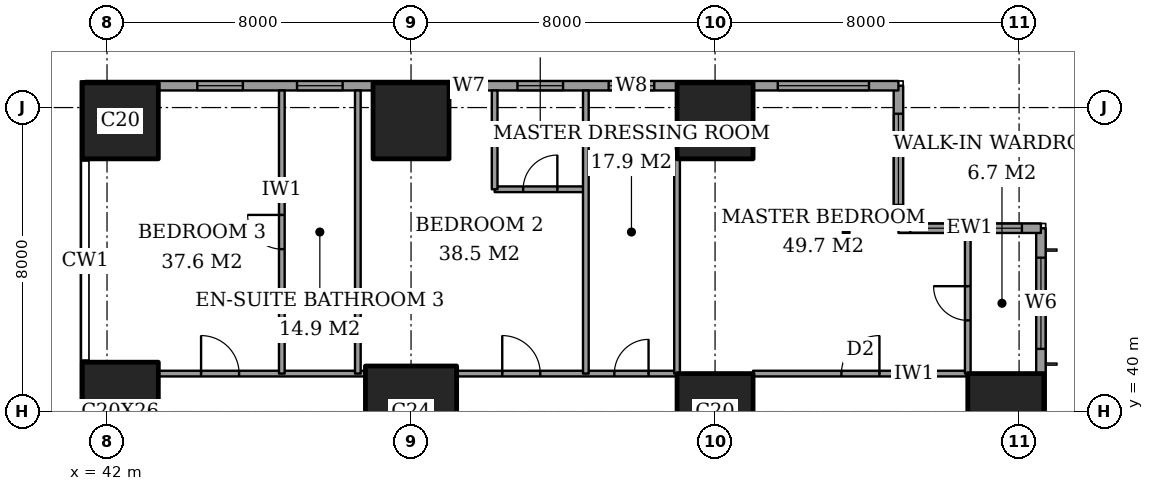
"""IFC4 building model, lengths in metres.
Left out: names, types, materials, properties, quantities, classifications, styles, units other than length and angle.
Written with IfcOpenShell. Run it as: python <this file> out.ifc"""

import sys

from ifc_helpers import new_model, si_unit, direction, frame, frame_2d, origin, origin_2d, place, context, subcontext, project, spatial, rectangle, extrude, element, fill, save


model = new_model("IFC4")
c1 = context("Model", 3, precision=1e-05, world=origin(), true_north=direction((0.0, 1.0)))
c2 = subcontext(c1, "Body", "Model", "MODEL_VIEW")
j1 = project(units=[si_unit("LENGTHUNIT", "METRE"), si_unit("PLANEANGLEUNIT", "RADIAN")], contexts=[c1])
p1 = place(None, origin())
s1 = spatial("IfcSite", under=j1, at=p1, CompositionType="ELEMENT")
p2 = place(p1, origin())
s2 = spatial("IfcBuilding", under=s1, at=p2, CompositionType="ELEMENT")
p3 = place(p2, frame((0.0, 0.0, 87.2)))
s3 = spatial("IfcBuildingStorey", under=s2, at=p3, CompositionType="ELEMENT", Elevation=87.2)
p4 = place(p3, frame((42.35, 40.0, 0.0), z_axis=(0.0, 0.0, 1.0), x_axis=(1.0, 0.0, 0.0)))
e1 = element("IfcColumn", 1, at=p4, inside=s3, PredefinedType="COLUMN", context=c2, shape_type="SweptSolid", body=[
    extrude(rectangle(XDim=2.0, YDim=2.6, at=origin_2d()), origin(), (0.0, 0.0, 1.0), 3.6),
])
p5 = place(p3, frame((42.35, 47.65, 0.0), z_axis=(0.0, 0.0, 1.0), x_axis=(1.0, 0.0, 0.0)))
e2 = element("IfcColumn", 2, at=p5, inside=s3, PredefinedType="COLUMN", context=c2, shape_type="SweptSolid", body=[
    extrude(rectangle(XDim=2.0, YDim=2.0, at=origin_2d()), origin(), (0.0, 0.0, 1.0), 3.6),
])
p6 = place(p3, frame((50.0, 40.0, 0.0), z_axis=(0.0, 0.0, 1.0), x_axis=(1.0, 0.0, 0.0)))
e3 = element("IfcColumn", 3, at=p6, inside=s3, PredefinedType="COLUMN", context=c2, shape_type="SweptSolid", body=[
    extrude(rectangle(XDim=2.4, YDim=2.4, at=origin_2d()), origin(), (0.0, 0.0, 1.0), 3.6),
])
for number, where, z_axis, x_axis in (
    (4, (50.0, 47.65, 0.0), (0.0, 0.0, 1.0), (1.0, 0.0, 0.0)),
    (5, (58.0, 40.0, 0.0), (0.0, 0.0, 1.0), (1.0, 0.0, 0.0)),
    (6, (58.0, 47.65, 0.0), (0.0, 0.0, 1.0), (1.0, 0.0, 0.0)),
    (7, (65.65, 40.0, 0.0), (0.0, 0.0, 1.0), (1.0, 0.0, 0.0)),
):
    element("IfcColumn", number, at=place(p3, frame(where, z_axis=z_axis, x_axis=x_axis)), inside=s3, PredefinedType="COLUMN", context=c2, shape_type="SweptSolid", body=[
        extrude(rectangle(XDim=2.0, YDim=2.0, at=origin_2d()), origin(), (0.0, 0.0, 1.0), 3.6),
    ])
p7 = place(p3, frame((66.575, 3.175, 0.0), z_axis=(0.0, 0.0, 1.0), x_axis=(0.0, 1.0, 0.0)))
e8 = element("IfcWall", 8, at=p7, inside=s3, PredefinedType="SOLIDWALL", context=c2, shape_type="SweptSolid", body=[
    extrude(rectangle(XDim=41.65, YDim=0.25, at=frame_2d((20.825, 0.0))), origin(), (0.0, 0.0, 1.0), 3.6),
])
p8 = place(p7, frame((0.775, 0.0, 0.6)))
e9 = element("IfcOpeningElement", 9, at=p8, cuts=e8, PredefinedType="OPENING", context=c2, shape_type="SweptSolid", body=[
    extrude(rectangle(XDim=2.4, YDim=2.0, at=frame_2d((1.2, 1.0))), frame((0.0, 0.135, 0.0), z_axis=(0.0, -1.0, 0.0), x_axis=(1.0, 0.0, 0.0)), (0.0, 0.0, 1.0), 0.27),
])
p9 = place(p7, frame((6.1, 0.0, 0.6)))
e10 = element("IfcOpeningElement", 10, at=p9, cuts=e8, PredefinedType="OPENING", context=c2, shape_type="SweptSolid", body=[
    extrude(rectangle(XDim=1.2, YDim=2.0, at=frame_2d((0.6, 1.0))), frame((0.0, 0.135, 0.0), z_axis=(0.0, -1.0, 0.0), x_axis=(1.0, 0.0, 0.0)), (0.0, 0.0, 1.0), 0.27),
])
p10 = place(p7, frame((8.275, 0.0, 0.6)))
e11 = element("IfcOpeningElement", 11, at=p10, cuts=e8, PredefinedType="OPENING", context=c2, shape_type="SweptSolid", body=[
    extrude(rectangle(XDim=2.4, YDim=2.0, at=frame_2d((1.2, 1.0))), frame((0.0, 0.135, 0.0), z_axis=(0.0, -1.0, 0.0), x_axis=(1.0, 0.0, 0.0)), (0.0, 0.0, 1.0), 0.27),
])
p11 = place(p7, frame((15.775, 0.0, 0.6)))
e12 = element("IfcOpeningElement", 12, at=p11, cuts=e8, PredefinedType="OPENING", context=c2, shape_type="SweptSolid", body=[
    extrude(rectangle(XDim=2.4, YDim=2.0, at=frame_2d((1.2, 1.0))), frame((0.0, 0.135, 0.0), z_axis=(0.0, -1.0, 0.0), x_axis=(1.0, 0.0, 0.0)), (0.0, 0.0, 1.0), 0.27),
])
p12 = place(p7, frame((23.475, 0.0, 0.6)))
e13 = element("IfcOpeningElement", 13, at=p12, cuts=e8, PredefinedType="OPENING", context=c2, shape_type="SweptSolid", body=[
    extrude(rectangle(XDim=2.4, YDim=2.0, at=frame_2d((1.2, 1.0))), frame((0.0, 0.135, 0.0), z_axis=(0.0, -1.0, 0.0), x_axis=(1.0, 0.0, 0.0)), (0.0, 0.0, 1.0), 0.27),
])
p13 = place(p7, frame((30.975, 0.0, 0.6)))
e14 = element("IfcOpeningElement", 14, at=p13, cuts=e8, PredefinedType="OPENING", context=c2, shape_type="SweptSolid", body=[
    extrude(rectangle(XDim=2.4, YDim=2.0, at=frame_2d((1.2, 1.0))), frame((0.0, 0.135, 0.0), z_axis=(0.0, -1.0, 0.0), x_axis=(1.0, 0.0, 0.0)), (0.0, 0.0, 1.0), 0.27),
])
p14 = place(p7, frame((34.5, 0.0, 0.6)))
e15 = element("IfcOpeningElement", 15, at=p14, cuts=e8, PredefinedType="OPENING", context=c2, shape_type="SweptSolid", body=[
    extrude(rectangle(XDim=1.2, YDim=2.0, at=frame_2d((0.6, 1.0))), frame((0.0, 0.135, 0.0), z_axis=(0.0, -1.0, 0.0), x_axis=(1.0, 0.0, 0.0)), (0.0, 0.0, 1.0), 0.27),
])
p15 = place(p7, frame((38.475, 0.0, 0.6)))
e16 = element("IfcOpeningElement", 16, at=p15, cuts=e8, PredefinedType="OPENING", context=c2, shape_type="SweptSolid", body=[
    extrude(rectangle(XDim=2.4, YDim=2.0, at=frame_2d((1.2, 1.0))), frame((0.0, 0.135, 0.0), z_axis=(0.0, -1.0, 0.0), x_axis=(1.0, 0.0, 0.0)), (0.0, 0.0, 1.0), 0.27),
])
p16 = place(p3, frame((66.575, 44.825, 0.0), z_axis=(0.0, 0.0, 1.0), x_axis=(-1.0, 0.0, 0.0)))
e17 = element("IfcWall", 17, at=p16, inside=s3, PredefinedType="SOLIDWALL", context=c2, shape_type="SweptSolid", body=[
    extrude(rectangle(XDim=3.75, YDim=0.25, at=frame_2d((1.875, 0.0))), origin(), (0.0, 0.0, 1.0), 3.6),
])
p17 = place(p16, frame((0.5, 0.0, 0.6)))
e18 = element("IfcOpeningElement", 18, at=p17, cuts=e17, PredefinedType="OPENING", context=c2, shape_type="SweptSolid", body=[
    extrude(rectangle(XDim=1.2, YDim=2.0, at=frame_2d((0.6, 1.0))), frame((0.0, 0.135, 0.0), z_axis=(0.0, -1.0, 0.0), x_axis=(1.0, 0.0, 0.0)), (0.0, 0.0, 1.0), 0.27),
])
p18 = place(p16, frame((2.238, 0.0, 0.6)))
e19 = element("IfcOpeningElement", 19, at=p18, cuts=e17, PredefinedType="OPENING", context=c2, shape_type="SweptSolid", body=[
    extrude(rectangle(XDim=1.2, YDim=2.0, at=frame_2d((0.6, 1.0))), frame((0.0, 0.135, 0.0), z_axis=(0.0, -1.0, 0.0), x_axis=(1.0, 0.0, 0.0)), (0.0, 0.0, 1.0), 0.27),
])
p19 = place(p3, frame((62.825, 44.825, 0.0), z_axis=(0.0, 0.0, 1.0), x_axis=(0.0, 1.0, 0.0)))
e20 = element("IfcWall", 20, at=p19, inside=s3, PredefinedType="SOLIDWALL", context=c2, shape_type="SweptSolid", body=[
    extrude(rectangle(XDim=3.75, YDim=0.25, at=frame_2d((1.875, 0.0))), origin(), (0.0, 0.0, 1.0), 3.6),
])
p20 = place(p19, frame((0.613, 0.0, 0.6)))
e21 = element("IfcOpeningElement", 21, at=p20, cuts=e20, PredefinedType="OPENING", context=c2, shape_type="SweptSolid", body=[
    extrude(rectangle(XDim=2.4, YDim=2.0, at=frame_2d((1.2, 1.0))), frame((0.0, 0.135, 0.0), z_axis=(0.0, -1.0, 0.0), x_axis=(1.0, 0.0, 0.0)), (0.0, 0.0, 1.0), 0.27),
])
p21 = place(p3, frame((62.825, 48.575, 0.0), z_axis=(0.0, 0.0, 1.0), x_axis=(-1.0, 0.0, 0.0)))
e22 = element("IfcWall", 22, at=p21, inside=s3, PredefinedType="SOLIDWALL", context=c2, shape_type="SweptSolid", body=[
    extrude(rectangle(XDim=21.4, YDim=0.25, at=frame_2d((10.7, 0.0))), origin(), (0.0, 0.0, 1.0), 3.6),
])
p22 = place(p21, frame((0.775, 0.0, 0.6)))
e23 = element("IfcOpeningElement", 23, at=p22, cuts=e22, PredefinedType="OPENING", context=c2, shape_type="SweptSolid", body=[
    extrude(rectangle(XDim=2.4, YDim=2.0, at=frame_2d((1.2, 1.0))), frame((0.0, 0.135, 0.0), z_axis=(0.0, -1.0, 0.0), x_axis=(1.0, 0.0, 0.0)), (0.0, 0.0, 1.0), 0.27),
])
p23 = place(p21, frame((6.425, 0.0, 0.6)))
e24 = element("IfcOpeningElement", 24, at=p23, cuts=e22, PredefinedType="OPENING", context=c2, shape_type="SweptSolid", body=[
    extrude(rectangle(XDim=1.2, YDim=2.0, at=frame_2d((0.6, 1.0))), frame((0.0, 0.135, 0.0), z_axis=(0.0, -1.0, 0.0), x_axis=(1.0, 0.0, 0.0)), (0.0, 0.0, 1.0), 0.27),
])
p24 = place(p21, frame((8.825, 0.0, 0.6)))
e25 = element("IfcOpeningElement", 25, at=p24, cuts=e22, PredefinedType="OPENING", context=c2, shape_type="SweptSolid", body=[
    extrude(rectangle(XDim=1.2, YDim=2.0, at=frame_2d((0.6, 1.0))), frame((0.0, 0.135, 0.0), z_axis=(0.0, -1.0, 0.0), x_axis=(1.0, 0.0, 0.0)), (0.0, 0.0, 1.0), 0.27),
])
p25 = place(p21, frame((11.0, 0.0, 0.6)))
e26 = element("IfcOpeningElement", 26, at=p25, cuts=e22, PredefinedType="OPENING", context=c2, shape_type="SweptSolid", body=[
    extrude(rectangle(XDim=0.6, YDim=2.0, at=frame_2d((0.3, 1.0))), frame((0.0, 0.135, 0.0), z_axis=(0.0, -1.0, 0.0), x_axis=(1.0, 0.0, 0.0)), (0.0, 0.0, 1.0), 0.27),
])
p26 = place(p21, frame((14.625, 0.0, 0.6)))
e27 = element("IfcOpeningElement", 27, at=p26, cuts=e22, PredefinedType="OPENING", context=c2, shape_type="SweptSolid", body=[
    extrude(rectangle(XDim=1.2, YDim=2.0, at=frame_2d((0.6, 1.0))), frame((0.0, 0.135, 0.0), z_axis=(0.0, -1.0, 0.0), x_axis=(1.0, 0.0, 0.0)), (0.0, 0.0, 1.0), 0.27),
])
p27 = place(p21, frame((17.25, 0.0, 0.6)))
e28 = element("IfcOpeningElement", 28, at=p27, cuts=e22, PredefinedType="OPENING", context=c2, shape_type="SweptSolid", body=[
    extrude(rectangle(XDim=1.2, YDim=2.0, at=frame_2d((0.6, 1.0))), frame((0.0, 0.135, 0.0), z_axis=(0.0, -1.0, 0.0), x_axis=(1.0, 0.0, 0.0)), (0.0, 0.0, 1.0), 0.27),
])
p28 = place(p3, frame((43.35, 41.0, 0.0), z_axis=(0.0, 0.0, 1.0), x_axis=(1.0, 0.0, 0.0)))
e29 = element("IfcWall", 29, at=p28, inside=s3, PredefinedType="PARTITIONING", context=c2, shape_type="SweptSolid", body=[
    extrude(rectangle(XDim=5.45, YDim=0.15, at=frame_2d((2.725, 0.0))), origin(), (0.0, 0.0, 1.0), 3.25),
])
p29 = place(p28, frame((1.125, 0.0, 0.0)))
e30 = element("IfcOpeningElement", 30, at=p29, cuts=e29, PredefinedType="OPENING", context=c2, shape_type="SweptSolid", body=[
    extrude(rectangle(XDim=1.0, YDim=2.1, at=frame_2d((0.5, 1.05))), frame((0.0, 0.085, 0.0), z_axis=(0.0, -1.0, 0.0), x_axis=(1.0, 0.0, 0.0)), (0.0, 0.0, 1.0), 0.17),
])
p30 = place(p3, frame((51.2, 41.0, 0.0), z_axis=(0.0, 0.0, 1.0), x_axis=(1.0, 0.0, 0.0)))
e31 = element("IfcWall", 31, at=p30, inside=s3, PredefinedType="PARTITIONING", context=c2, shape_type="SweptSolid", body=[
    extrude(rectangle(XDim=5.8, YDim=0.15, at=frame_2d((2.9, 0.0))), origin(), (0.0, 0.0, 1.0), 3.25),
])
p31 = place(p30, frame((4.15, 0.0, 0.0)))
e32 = element("IfcOpeningElement", 32, at=p31, cuts=e31, PredefinedType="OPENING", context=c2, shape_type="SweptSolid", body=[
    extrude(rectangle(XDim=0.9, YDim=2.1, at=frame_2d((0.45, 1.05))), frame((0.0, 0.085, 0.0), z_axis=(0.0, -1.0, 0.0), x_axis=(1.0, 0.0, 0.0)), (0.0, 0.0, 1.0), 0.17),
])
p32 = place(p30, frame((1.2, 0.0, 0.0)))
e33 = element("IfcOpeningElement", 33, at=p32, cuts=e31, PredefinedType="OPENING", context=c2, shape_type="SweptSolid", body=[
    extrude(rectangle(XDim=1.0, YDim=2.1, at=frame_2d((0.5, 1.05))), frame((0.0, 0.085, 0.0), z_axis=(0.0, -1.0, 0.0), x_axis=(1.0, 0.0, 0.0)), (0.0, 0.0, 1.0), 0.17),
])
p33 = place(p3, frame((59.0, 41.0, 0.0), z_axis=(0.0, 0.0, 1.0), x_axis=(1.0, 0.0, 0.0)))
e34 = element("IfcWall", 34, at=p33, inside=s3, PredefinedType="PARTITIONING", context=c2, shape_type="SweptSolid", body=[
    extrude(rectangle(XDim=5.65, YDim=0.15, at=frame_2d((2.825, 0.0))), origin(), (0.0, 0.0, 1.0), 3.25),
])
p34 = place(p33, frame((2.325, 0.0, 0.0)))
e35 = element("IfcOpeningElement", 35, at=p34, cuts=e34, PredefinedType="OPENING", context=c2, shape_type="SweptSolid", body=[
    extrude(rectangle(XDim=1.0, YDim=2.1, at=frame_2d((0.5, 1.05))), frame((0.0, 0.085, 0.0), z_axis=(0.0, -1.0, 0.0), x_axis=(1.0, 0.0, 0.0)), (0.0, 0.0, 1.0), 0.17),
])
p35 = place(p3, frame((52.2, 45.85, 0.0), z_axis=(0.0, 0.0, 1.0), x_axis=(1.0, 0.0, 0.0)))
e36 = element("IfcWall", 36, at=p35, inside=s3, PredefinedType="PARTITIONING", context=c2, shape_type="SweptSolid", body=[
    extrude(rectangle(XDim=2.4, YDim=0.15, at=frame_2d((1.2, 0.0))), origin(), (0.0, 0.0, 1.0), 3.25),
])
p36 = place(p35, frame((0.75, 0.0, 0.0)))
e37 = element("IfcOpeningElement", 37, at=p36, cuts=e36, PredefinedType="OPENING", context=c2, shape_type="SweptSolid", body=[
    extrude(rectangle(XDim=0.9, YDim=2.1, at=frame_2d((0.45, 1.05))), frame((0.0, 0.085, 0.0), z_axis=(0.0, -1.0, 0.0), x_axis=(1.0, 0.0, 0.0)), (0.0, 0.0, 1.0), 0.17),
])
p37 = place(p3, frame((46.6, 41.0, 0.0), z_axis=(0.0, 0.0, 1.0), x_axis=(0.0, 1.0, 0.0)))
e38 = element("IfcWall", 38, at=p37, inside=s3, PredefinedType="PARTITIONING", context=c2, shape_type="SweptSolid", body=[
    extrude(rectangle(XDim=7.45, YDim=0.15, at=frame_2d((3.725, 0.0))), origin(), (0.0, 0.0, 1.0), 3.25),
])
p38 = place(p37, frame((3.275, 0.0, 0.0)))
e39 = element("IfcOpeningElement", 39, at=p38, cuts=e38, PredefinedType="OPENING", context=c2, shape_type="SweptSolid", body=[
    extrude(rectangle(XDim=0.9, YDim=2.1, at=frame_2d((0.45, 1.05))), frame((0.0, 0.085, 0.0), z_axis=(0.0, -1.0, 0.0), x_axis=(1.0, 0.0, 0.0)), (0.0, 0.0, 1.0), 0.17),
])
p39 = place(p3, frame((48.6, 41.0, 0.0), z_axis=(0.0, 0.0, 1.0), x_axis=(0.0, 1.0, 0.0)))
e40 = element("IfcWall", 40, at=p39, inside=s3, PredefinedType="PARTITIONING", context=c2, shape_type="SweptSolid", body=[
    extrude(rectangle(XDim=7.45, YDim=0.15, at=frame_2d((3.725, 0.0))), origin(), (0.0, 0.0, 1.0), 3.25),
])
p40 = place(p3, frame((52.2, 45.85, 0.0), z_axis=(0.0, 0.0, 1.0), x_axis=(0.0, 1.0, 0.0)))
e41 = element("IfcWall", 41, at=p40, inside=s3, PredefinedType="PARTITIONING", context=c2, shape_type="SweptSolid", body=[
    extrude(rectangle(XDim=2.6, YDim=0.15, at=frame_2d((1.3, 0.0))), origin(), (0.0, 0.0, 1.0), 3.25),
])
p41 = place(p3, frame((54.6, 41.0, 0.0), z_axis=(0.0, 0.0, 1.0), x_axis=(0.0, 1.0, 0.0)))
e42 = element("IfcWall", 42, at=p41, inside=s3, PredefinedType="PARTITIONING", context=c2, shape_type="SweptSolid", body=[
    extrude(rectangle(XDim=7.45, YDim=0.15, at=frame_2d((3.725, 0.0))), origin(), (0.0, 0.0, 1.0), 3.25),
])
p42 = place(p3, frame((57.0, 41.0, 0.0), z_axis=(0.0, 0.0, 1.0), x_axis=(0.0, 1.0, 0.0)))
e43 = element("IfcWall", 43, at=p42, inside=s3, PredefinedType="PARTITIONING", context=c2, shape_type="SweptSolid", body=[
    extrude(rectangle(XDim=5.65, YDim=0.15, at=frame_2d((2.825, 0.0))), origin(), (0.0, 0.0, 1.0), 3.25),
])
p43 = place(p3, frame((64.65, 41.0, 0.0), z_axis=(0.0, 0.0, 1.0), x_axis=(0.0, 1.0, 0.0)))
e44 = element("IfcWall", 44, at=p43, inside=s3, PredefinedType="PARTITIONING", context=c2, shape_type="SweptSolid", body=[
    extrude(rectangle(XDim=3.7, YDim=0.15, at=frame_2d((1.85, 0.0))), origin(), (0.0, 0.0, 1.0), 3.25),
])
p44 = place(p43, frame((1.4, 0.0, 0.0)))
e45 = element("IfcOpeningElement", 45, at=p44, cuts=e44, PredefinedType="OPENING", context=c2, shape_type="SweptSolid", body=[
    extrude(rectangle(XDim=0.9, YDim=2.1, at=frame_2d((0.45, 1.05))), frame((0.0, 0.085, 0.0), z_axis=(0.0, -1.0, 0.0), x_axis=(1.0, 0.0, 0.0)), (0.0, 0.0, 1.0), 0.17),
])
p45 = place(p15, origin())
e46 = element("IfcWindow", 46, at=p45, inside=s3, PartitioningType="SINGLE_PANEL", PredefinedType="WINDOW", context=c2, shape_type="SweptSolid", body=[
    extrude(rectangle(XDim=2.4, YDim=2.0, at=frame_2d((1.2, 1.0))), frame((0.0, 0.03, 0.0), z_axis=(0.0, -1.0, 0.0), x_axis=(1.0, 0.0, 0.0)), (0.0, 0.0, 1.0), 0.06),
])
fill(e16, e46)
p46 = place(p17, origin())
e47 = element("IfcWindow", 47, at=p46, inside=s3, PartitioningType="SINGLE_PANEL", PredefinedType="WINDOW", context=c2, shape_type="SweptSolid", body=[
    extrude(rectangle(XDim=1.2, YDim=2.0, at=frame_2d((0.6, 1.0))), frame((0.0, 0.03, 0.0), z_axis=(0.0, -1.0, 0.0), x_axis=(1.0, 0.0, 0.0)), (0.0, 0.0, 1.0), 0.06),
])
fill(e18, e47)
p47 = place(p18, origin())
e48 = element("IfcWindow", 48, at=p47, inside=s3, PartitioningType="SINGLE_PANEL", PredefinedType="WINDOW", context=c2, shape_type="SweptSolid", body=[
    extrude(rectangle(XDim=1.2, YDim=2.0, at=frame_2d((0.6, 1.0))), frame((0.0, 0.03, 0.0), z_axis=(0.0, -1.0, 0.0), x_axis=(1.0, 0.0, 0.0)), (0.0, 0.0, 1.0), 0.06),
])
fill(e19, e48)
p48 = place(p20, origin())
e49 = element("IfcWindow", 49, at=p48, inside=s3, PartitioningType="SINGLE_PANEL", PredefinedType="WINDOW", context=c2, shape_type="SweptSolid", body=[
    extrude(rectangle(XDim=2.4, YDim=2.0, at=frame_2d((1.2, 1.0))), frame((0.0, 0.03, 0.0), z_axis=(0.0, -1.0, 0.0), x_axis=(1.0, 0.0, 0.0)), (0.0, 0.0, 1.0), 0.06),
])
fill(e21, e49)
p49 = place(p22, origin())
e50 = element("IfcWindow", 50, at=p49, inside=s3, PartitioningType="SINGLE_PANEL", PredefinedType="WINDOW", context=c2, shape_type="SweptSolid", body=[
    extrude(rectangle(XDim=2.4, YDim=2.0, at=frame_2d((1.2, 1.0))), frame((0.0, 0.03, 0.0), z_axis=(0.0, -1.0, 0.0), x_axis=(1.0, 0.0, 0.0)), (0.0, 0.0, 1.0), 0.06),
])
fill(e23, e50)
p50 = place(p23, origin())
e51 = element("IfcWindow", 51, at=p50, inside=s3, PartitioningType="SINGLE_PANEL", PredefinedType="WINDOW", context=c2, shape_type="SweptSolid", body=[
    extrude(rectangle(XDim=1.2, YDim=2.0, at=frame_2d((0.6, 1.0))), frame((0.0, 0.03, 0.0), z_axis=(0.0, -1.0, 0.0), x_axis=(1.0, 0.0, 0.0)), (0.0, 0.0, 1.0), 0.06),
])
fill(e24, e51)
p51 = place(p24, origin())
e52 = element("IfcWindow", 52, at=p51, inside=s3, PartitioningType="SINGLE_PANEL", PredefinedType="WINDOW", context=c2, shape_type="SweptSolid", body=[
    extrude(rectangle(XDim=1.2, YDim=2.0, at=frame_2d((0.6, 1.0))), frame((0.0, 0.03, 0.0), z_axis=(0.0, -1.0, 0.0), x_axis=(1.0, 0.0, 0.0)), (0.0, 0.0, 1.0), 0.06),
])
fill(e25, e52)
p52 = place(p25, origin())
e53 = element("IfcWindow", 53, at=p52, inside=s3, PartitioningType="SINGLE_PANEL", PredefinedType="WINDOW", context=c2, shape_type="SweptSolid", body=[
    extrude(rectangle(XDim=0.6, YDim=2.0, at=frame_2d((0.3, 1.0))), frame((0.0, 0.03, 0.0), z_axis=(0.0, -1.0, 0.0), x_axis=(1.0, 0.0, 0.0)), (0.0, 0.0, 1.0), 0.06),
])
fill(e26, e53)
p53 = place(p26, origin())
e54 = element("IfcWindow", 54, at=p53, inside=s3, PartitioningType="SINGLE_PANEL", PredefinedType="WINDOW", context=c2, shape_type="SweptSolid", body=[
    extrude(rectangle(XDim=1.2, YDim=2.0, at=frame_2d((0.6, 1.0))), frame((0.0, 0.03, 0.0), z_axis=(0.0, -1.0, 0.0), x_axis=(1.0, 0.0, 0.0)), (0.0, 0.0, 1.0), 0.06),
])
fill(e27, e54)
p54 = place(p27, origin())
e55 = element("IfcWindow", 55, at=p54, inside=s3, PartitioningType="SINGLE_PANEL", PredefinedType="WINDOW", context=c2, shape_type="SweptSolid", body=[
    extrude(rectangle(XDim=1.2, YDim=2.0, at=frame_2d((0.6, 1.0))), frame((0.0, 0.03, 0.0), z_axis=(0.0, -1.0, 0.0), x_axis=(1.0, 0.0, 0.0)), (0.0, 0.0, 1.0), 0.06),
])
fill(e28, e55)
p55 = place(p44, origin())
e56 = element("IfcDoor", 56, at=p55, inside=s3, OperationType="SINGLE_SWING_LEFT", PredefinedType="DOOR", context=c2, shape_type="SweptSolid", body=[
    extrude(rectangle(XDim=0.9, YDim=2.1, at=frame_2d((0.45, 1.05))), frame((0.0, 0.025, 0.0), z_axis=(0.0, -1.0, 0.0), x_axis=(1.0, 0.0, 0.0)), (0.0, 0.0, 1.0), 0.05),
])
fill(e45, e56)
p56 = place(p34, origin())
e57 = element("IfcDoor", 57, at=p56, inside=s3, OperationType="SINGLE_SWING_LEFT", PredefinedType="DOOR", context=c2, shape_type="SweptSolid", body=[
    extrude(rectangle(XDim=1.0, YDim=2.1, at=frame_2d((0.5, 1.05))), frame((0.0, 0.025, 0.0), z_axis=(0.0, -1.0, 0.0), x_axis=(1.0, 0.0, 0.0)), (0.0, 0.0, 1.0), 0.05),
])
fill(e35, e57)
p57 = place(p31, origin())
e58 = element("IfcDoor", 58, at=p57, inside=s3, OperationType="SINGLE_SWING_LEFT", PredefinedType="DOOR", context=c2, shape_type="SweptSolid", body=[
    extrude(rectangle(XDim=0.9, YDim=2.1, at=frame_2d((0.45, 1.05))), frame((0.0, 0.025, 0.0), z_axis=(0.0, -1.0, 0.0), x_axis=(1.0, 0.0, 0.0)), (0.0, 0.0, 1.0), 0.05),
])
fill(e32, e58)
p58 = place(p36, origin())
e59 = element("IfcDoor", 59, at=p58, inside=s3, OperationType="SINGLE_SWING_LEFT", PredefinedType="DOOR", context=c2, shape_type="SweptSolid", body=[
    extrude(rectangle(XDim=0.9, YDim=2.1, at=frame_2d((0.45, 1.05))), frame((0.0, 0.025, 0.0), z_axis=(0.0, -1.0, 0.0), x_axis=(1.0, 0.0, 0.0)), (0.0, 0.0, 1.0), 0.05),
])
fill(e37, e59)
p59 = place(p32, origin())
e60 = element("IfcDoor", 60, at=p59, inside=s3, OperationType="SINGLE_SWING_RIGHT", PredefinedType="DOOR", context=c2, shape_type="SweptSolid", body=[
    extrude(rectangle(XDim=1.0, YDim=2.1, at=frame_2d((0.5, 1.05))), frame((0.0, 0.025, 0.0), z_axis=(0.0, -1.0, 0.0), x_axis=(1.0, 0.0, 0.0)), (0.0, 0.0, 1.0), 0.05),
])
fill(e33, e60)
p60 = place(p38, origin())
e61 = element("IfcDoor", 61, at=p60, inside=s3, OperationType="SINGLE_SWING_LEFT", PredefinedType="DOOR", context=c2, shape_type="SweptSolid", body=[
    extrude(rectangle(XDim=0.9, YDim=2.1, at=frame_2d((0.45, 1.05))), frame((0.0, 0.025, 0.0), z_axis=(0.0, -1.0, 0.0), x_axis=(1.0, 0.0, 0.0)), (0.0, 0.0, 1.0), 0.05),
])
fill(e39, e61)
p61 = place(p29, origin())
e62 = element("IfcDoor", 62, at=p61, inside=s3, OperationType="SINGLE_SWING_RIGHT", PredefinedType="DOOR", context=c2, shape_type="SweptSolid", body=[
    extrude(rectangle(XDim=1.0, YDim=2.1, at=frame_2d((0.5, 1.05))), frame((0.0, 0.025, 0.0), z_axis=(0.0, -1.0, 0.0), x_axis=(1.0, 0.0, 0.0)), (0.0, 0.0, 1.0), 0.05),
])
fill(e30, e62)
save(model, sys.argv[1])
